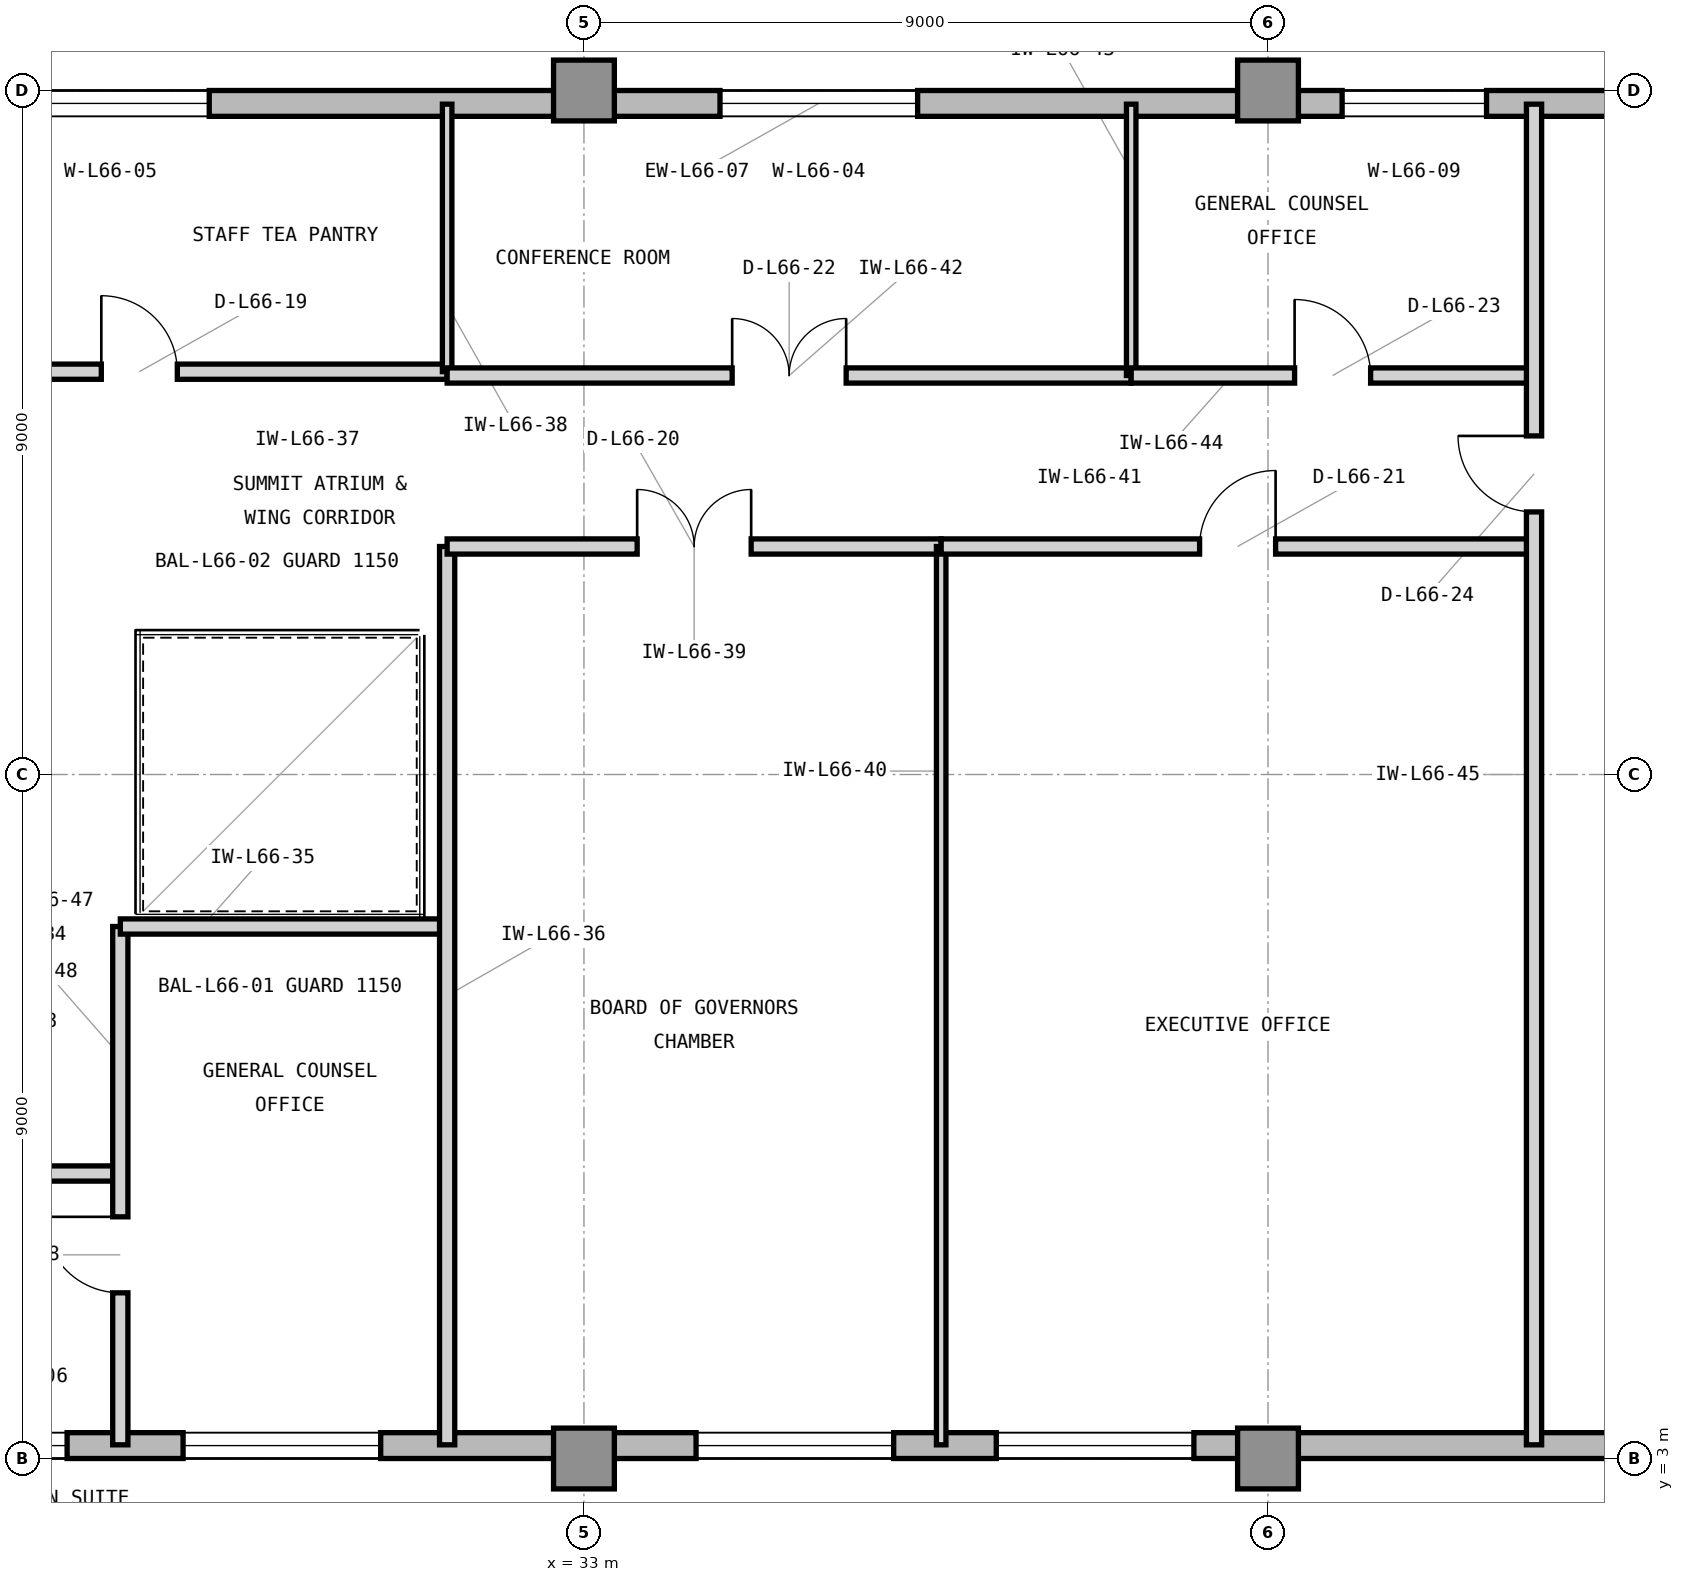
"""IFC4 building model, lengths in metres.
Left out: names, types, materials, properties, quantities, classifications, styles, units other than length and angle.
Written with IfcOpenShell. Run it as: python <this file> out.ifc"""

import sys

from ifc_helpers import new_model, si_unit, direction, frame, frame_2d, origin, origin_2d, place, context, subcontext, project, spatial, rectangle, extrude, element, fill, save


model = new_model("IFC4")
c1 = context("Model", 3, precision=1e-05, world=origin(), true_north=direction((0.0, 1.0)))
c2 = subcontext(c1, "Body", "Model", "MODEL_VIEW")
j1 = project(units=[si_unit("LENGTHUNIT", "METRE"), si_unit("PLANEANGLEUNIT", "RADIAN")], contexts=[c1])
p1 = place(None, origin())
s1 = spatial("IfcSite", under=j1, at=p1, CompositionType="ELEMENT")
p2 = place(p1, origin())
s2 = spatial("IfcBuilding", under=s1, at=p2, CompositionType="ELEMENT")
p3 = place(p2, frame((0.0, 0.0, 270.3)))
s3 = spatial("IfcBuildingStorey", under=s2, at=p3, CompositionType="ELEMENT", Elevation=270.3)
for number, where, z_axis, x_axis in (
    (1, (33.0, 3.0, 0.0), (0.0, 0.0, 1.0), (1.0, 0.0, 0.0)),
    (2, (33.0, 21.0, 0.0), (0.0, 0.0, 1.0), (1.0, 0.0, 0.0)),
    (3, (42.0, 3.0, 0.0), (0.0, 0.0, 1.0), (1.0, 0.0, 0.0)),
    (4, (42.0, 21.0, 0.0), (0.0, 0.0, 1.0), (1.0, 0.0, 0.0)),
):
    element("IfcColumn", number, at=place(p3, frame(where, z_axis=z_axis, x_axis=x_axis)), inside=s3, PredefinedType="COLUMN", context=c2, shape_type="SweptSolid", body=[
        extrude(rectangle(XDim=0.8, YDim=0.8, at=origin_2d()), origin(), (0.0, 0.0, 1.0), 3.9),
    ])
p4 = place(p3, frame((23.9, 3.17, 0.0), z_axis=(0.0, 0.0, 1.0), x_axis=(1.0, 0.0, 0.0)))
e5 = element("IfcWall", 5, at=p4, inside=s3, PredefinedType="STANDARD", context=c2, shape_type="SweptSolid", body=[
    extrude(rectangle(XDim=28.5, YDim=0.34, at=frame_2d((14.25, 0.0))), origin(), (0.0, 0.0, 1.0), 3.715),
])
p5 = place(p4, frame((10.575, 0.0, 0.8)))
e6 = element("IfcOpeningElement", 6, at=p5, cuts=e5, PredefinedType="OPENING", context=c2, shape_type="SweptSolid", body=[
    extrude(rectangle(XDim=2.6, YDim=2.35, at=frame_2d((1.3, 1.175))), frame((0.0, 0.18, 0.0), z_axis=(0.0, -1.0, 0.0), x_axis=(1.0, 0.0, 0.0)), (0.0, 0.0, 1.0), 0.36),
])
p6 = place(p4, frame((1.1, 0.0, 0.8)))
e7 = element("IfcOpeningElement", 7, at=p6, cuts=e5, PredefinedType="OPENING", context=c2, shape_type="SweptSolid", body=[
    extrude(rectangle(XDim=1.2, YDim=2.35, at=frame_2d((0.6, 1.175))), frame((0.0, 0.18, 0.0), z_axis=(0.0, -1.0, 0.0), x_axis=(1.0, 0.0, 0.0)), (0.0, 0.0, 1.0), 0.36),
])
p7 = place(p4, frame((3.826, 0.0, 0.8)))
e8 = element("IfcOpeningElement", 8, at=p7, cuts=e5, PredefinedType="OPENING", context=c2, shape_type="SweptSolid", body=[
    extrude(rectangle(XDim=2.6, YDim=2.35, at=frame_2d((1.3, 1.175))), frame((0.0, 0.18, 0.0), z_axis=(0.0, -1.0, 0.0), x_axis=(1.0, 0.0, 0.0)), (0.0, 0.0, 1.0), 0.36),
])
p8 = place(p4, frame((14.525, 0.0, 0.8)))
e9 = element("IfcOpeningElement", 9, at=p8, cuts=e5, PredefinedType="OPENING", context=c2, shape_type="SweptSolid", body=[
    extrude(rectangle(XDim=2.6, YDim=2.35, at=frame_2d((1.3, 1.175))), frame((0.0, 0.18, 0.0), z_axis=(0.0, -1.0, 0.0), x_axis=(1.0, 0.0, 0.0)), (0.0, 0.0, 1.0), 0.36),
])
p9 = place(p3, frame((52.4, 20.83, 0.0), z_axis=(0.0, 0.0, 1.0), x_axis=(-1.0, 0.0, 0.0)))
e10 = element("IfcWall", 10, at=p9, inside=s3, PredefinedType="STANDARD", context=c2, shape_type="SweptSolid", body=[
    extrude(rectangle(XDim=32.62, YDim=0.34, at=frame_2d((16.31, 0.0))), origin(), (0.0, 0.0, 1.0), 3.715),
])
p10 = place(p9, frame((15.01, 0.0, 0.8)))
e11 = element("IfcOpeningElement", 11, at=p10, cuts=e10, PredefinedType="OPENING", context=c2, shape_type="SweptSolid", body=[
    extrude(rectangle(XDim=2.6, YDim=2.35, at=frame_2d((1.3, 1.175))), frame((0.0, 0.18, 0.0), z_axis=(0.0, -1.0, 0.0), x_axis=(1.0, 0.0, 0.0)), (0.0, 0.0, 1.0), 0.36),
])
p11 = place(p9, frame((24.33, 0.0, 0.8)))
e12 = element("IfcOpeningElement", 12, at=p11, cuts=e10, PredefinedType="OPENING", context=c2, shape_type="SweptSolid", body=[
    extrude(rectangle(XDim=2.6, YDim=2.35, at=frame_2d((1.3, 1.175))), frame((0.0, 0.18, 0.0), z_axis=(0.0, -1.0, 0.0), x_axis=(1.0, 0.0, 0.0)), (0.0, 0.0, 1.0), 0.36),
])
p12 = place(p9, frame((7.525, 0.0, 0.8)))
e13 = element("IfcOpeningElement", 13, at=p12, cuts=e10, PredefinedType="OPENING", context=c2, shape_type="SweptSolid", body=[
    extrude(rectangle(XDim=1.9, YDim=2.35, at=frame_2d((0.95, 1.175))), frame((0.0, 0.18, 0.0), z_axis=(0.0, -1.0, 0.0), x_axis=(1.0, 0.0, 0.0)), (0.0, 0.0, 1.0), 0.36),
])
p13 = place(p3, frame((23.85, 6.75, 0.0), z_axis=(0.0, 0.0, 1.0), x_axis=(1.0, 0.0, 0.0)))
e14 = element("IfcWall", 14, at=p13, inside=s3, PredefinedType="PARTITIONING", context=c2, shape_type="SweptSolid", body=[
    extrude(rectangle(XDim=3.05, YDim=0.2, at=frame_2d((1.525, 0.0))), origin(), (0.0, 0.0, 1.0), 3.705),
])
p14 = place(p13, frame((0.9, 0.0, 0.0)))
e15 = element("IfcOpeningElement", 15, at=p14, cuts=e14, PredefinedType="OPENING", context=c2, shape_type="SweptSolid", body=[
    extrude(rectangle(XDim=1.0, YDim=2.15, at=frame_2d((0.5, 1.075))), frame((0.0, 0.11, 0.0), z_axis=(0.0, -1.0, 0.0), x_axis=(1.0, 0.0, 0.0)), (0.0, 0.0, 1.0), 0.22),
])
p15 = place(p3, frame((26.9, 3.18, 0.0), z_axis=(0.0, 0.0, 1.0), x_axis=(0.0, 1.0, 0.0)))
e16 = element("IfcWall", 16, at=p15, inside=s3, PredefinedType="PARTITIONING", context=c2, shape_type="SweptSolid", body=[
    extrude(rectangle(XDim=6.82, YDim=0.2, at=frame_2d((3.41, 0.0))), origin(), (0.0, 0.0, 1.0), 3.705),
])
p16 = place(p15, frame((2.0, 0.0, 0.0)))
e17 = element("IfcOpeningElement", 17, at=p16, cuts=e16, PredefinedType="OPENING", context=c2, shape_type="SweptSolid", body=[
    extrude(rectangle(XDim=1.0, YDim=2.15, at=frame_2d((0.5, 1.075))), frame((0.0, 0.11, 0.0), z_axis=(0.0, -1.0, 0.0), x_axis=(1.0, 0.0, 0.0)), (0.0, 0.0, 1.0), 0.22),
])
p17 = place(p3, frame((26.9, 10.0, 0.0), z_axis=(0.0, 0.0, 1.0), x_axis=(1.0, 0.0, 0.0)))
e18 = element("IfcWall", 18, at=p17, inside=s3, PredefinedType="PARTITIONING", context=c2, shape_type="SweptSolid", body=[
    extrude(rectangle(XDim=4.3, YDim=0.2, at=frame_2d((2.15, 0.0))), origin(), (0.0, 0.0, 1.0), 3.705),
])
p18 = place(p3, frame((31.2, 3.18, 0.0), z_axis=(0.0, 0.0, 1.0), x_axis=(0.0, 1.0, 0.0)))
e19 = element("IfcWall", 19, at=p18, inside=s3, PredefinedType="PARTITIONING", context=c2, shape_type="SweptSolid", body=[
    extrude(rectangle(XDim=11.82, YDim=0.2, at=frame_2d((5.91, 0.0))), origin(), (0.0, 0.0, 1.0), 3.705),
])
p19 = place(p3, frame((23.85, 17.3, 0.0), z_axis=(0.0, 0.0, 1.0), x_axis=(1.0, 0.0, 0.0)))
e20 = element("IfcWall", 20, at=p19, inside=s3, PredefinedType="PARTITIONING", context=c2, shape_type="SweptSolid", body=[
    extrude(rectangle(XDim=7.35, YDim=0.2, at=frame_2d((3.675, 0.0))), origin(), (0.0, 0.0, 1.0), 3.705),
])
p20 = place(p19, frame((2.8, 0.0, 0.0)))
e21 = element("IfcOpeningElement", 21, at=p20, cuts=e20, PredefinedType="OPENING", context=c2, shape_type="SweptSolid", body=[
    extrude(rectangle(XDim=1.0, YDim=2.15, at=frame_2d((0.5, 1.075))), frame((0.0, 0.11, 0.0), z_axis=(0.0, -1.0, 0.0), x_axis=(1.0, 0.0, 0.0)), (0.0, 0.0, 1.0), 0.22),
])
p21 = place(p3, frame((31.2, 17.3, 0.0), z_axis=(0.0, 0.0, 1.0), x_axis=(0.0, 1.0, 0.0)))
e22 = element("IfcWall", 22, at=p21, inside=s3, PredefinedType="PARTITIONING", context=c2, shape_type="SweptSolid", body=[
    extrude(rectangle(XDim=3.52, YDim=0.125, at=frame_2d((1.76, 0.0))), origin(), (0.0, 0.0, 1.0), 3.705),
])
p22 = place(p3, frame((31.2, 15.0, 0.0), z_axis=(0.0, 0.0, 1.0), x_axis=(1.0, 0.0, 0.0)))
e23 = element("IfcWall", 23, at=p22, inside=s3, PredefinedType="PARTITIONING", context=c2, shape_type="SweptSolid", body=[
    extrude(rectangle(XDim=6.5, YDim=0.2, at=frame_2d((3.25, 0.0))), origin(), (0.0, 0.0, 1.0), 3.301),
])
p23 = place(p22, frame((2.5, 0.0, 0.0)))
e24 = element("IfcOpeningElement", 24, at=p23, cuts=e23, PredefinedType="OPENING", context=c2, shape_type="SweptSolid", body=[
    extrude(rectangle(XDim=1.5, YDim=2.3, at=frame_2d((0.75, 1.15))), frame((0.0, 0.11, 0.0), z_axis=(0.0, -1.0, 0.0), x_axis=(1.0, 0.0, 0.0)), (0.0, 0.0, 1.0), 0.22),
])
p24 = place(p3, frame((37.7, 3.18, 0.0), z_axis=(0.0, 0.0, 1.0), x_axis=(0.0, 1.0, 0.0)))
e25 = element("IfcWall", 25, at=p24, inside=s3, PredefinedType="PARTITIONING", context=c2, shape_type="SweptSolid", body=[
    extrude(rectangle(XDim=11.82, YDim=0.125, at=frame_2d((5.91, 0.0))), origin(), (0.0, 0.0, 1.0), 3.705),
])
p25 = place(p3, frame((37.7, 15.0, 0.0), z_axis=(0.0, 0.0, 1.0), x_axis=(1.0, 0.0, 0.0)))
e26 = element("IfcWall", 26, at=p25, inside=s3, PredefinedType="PARTITIONING", context=c2, shape_type="SweptSolid", body=[
    extrude(rectangle(XDim=7.8, YDim=0.2, at=frame_2d((3.9, 0.0))), origin(), (0.0, 0.0, 1.0), 3.301),
])
p26 = place(p25, frame((3.4, 0.0, 0.0)))
e27 = element("IfcOpeningElement", 27, at=p26, cuts=e26, PredefinedType="OPENING", context=c2, shape_type="SweptSolid", body=[
    extrude(rectangle(XDim=1.0, YDim=2.15, at=frame_2d((0.5, 1.075))), frame((0.0, 0.11, 0.0), z_axis=(0.0, -1.0, 0.0), x_axis=(1.0, 0.0, 0.0)), (0.0, 0.0, 1.0), 0.22),
])
p27 = place(p3, frame((31.2, 17.25, 0.0), z_axis=(0.0, 0.0, 1.0), x_axis=(1.0, 0.0, 0.0)))
e28 = element("IfcWall", 28, at=p27, inside=s3, PredefinedType="PARTITIONING", context=c2, shape_type="SweptSolid", body=[
    extrude(rectangle(XDim=9.0, YDim=0.2, at=frame_2d((4.5, 0.0))), origin(), (0.0, 0.0, 1.0), 3.705),
])
p28 = place(p27, frame((3.75, 0.0, 0.0)))
e29 = element("IfcOpeningElement", 29, at=p28, cuts=e28, PredefinedType="OPENING", context=c2, shape_type="SweptSolid", body=[
    extrude(rectangle(XDim=1.5, YDim=2.3, at=frame_2d((0.75, 1.15))), frame((0.0, 0.11, 0.0), z_axis=(0.0, -1.0, 0.0), x_axis=(1.0, 0.0, 0.0)), (0.0, 0.0, 1.0), 0.22),
])
p29 = place(p3, frame((40.2, 17.25, 0.0), z_axis=(0.0, 0.0, 1.0), x_axis=(0.0, 1.0, 0.0)))
e30 = element("IfcWall", 30, at=p29, inside=s3, PredefinedType="PARTITIONING", context=c2, shape_type="SweptSolid", body=[
    extrude(rectangle(XDim=3.57, YDim=0.125, at=frame_2d((1.785, 0.0))), origin(), (0.0, 0.0, 1.0), 3.705),
])
p30 = place(p3, frame((40.2, 17.25, 0.0), z_axis=(0.0, 0.0, 1.0), x_axis=(1.0, 0.0, 0.0)))
e31 = element("IfcWall", 31, at=p30, inside=s3, PredefinedType="PARTITIONING", context=c2, shape_type="SweptSolid", body=[
    extrude(rectangle(XDim=5.3, YDim=0.2, at=frame_2d((2.65, 0.0))), origin(), (0.0, 0.0, 1.0), 3.705),
])
p31 = place(p30, frame((2.15, 0.0, 0.0)))
e32 = element("IfcOpeningElement", 32, at=p31, cuts=e31, PredefinedType="OPENING", context=c2, shape_type="SweptSolid", body=[
    extrude(rectangle(XDim=1.0, YDim=2.15, at=frame_2d((0.5, 1.075))), frame((0.0, 0.11, 0.0), z_axis=(0.0, -1.0, 0.0), x_axis=(1.0, 0.0, 0.0)), (0.0, 0.0, 1.0), 0.22),
])
p32 = place(p3, frame((45.5, 3.18, 0.0), z_axis=(0.0, 0.0, 1.0), x_axis=(0.0, 1.0, 0.0)))
e33 = element("IfcWall", 33, at=p32, inside=s3, PredefinedType="PARTITIONING", context=c2, shape_type="SweptSolid", body=[
    extrude(rectangle(XDim=17.64, YDim=0.2, at=frame_2d((8.82, 0.0))), origin(), (0.0, 0.0, 1.0), 3.705),
])
p33 = place(p32, frame((12.275, 0.0, 0.0)))
e34 = element("IfcOpeningElement", 34, at=p33, cuts=e33, PredefinedType="OPENING", context=c2, shape_type="SweptSolid", body=[
    extrude(rectangle(XDim=1.0, YDim=2.15, at=frame_2d((0.5, 1.075))), frame((0.0, 0.11, 0.0), z_axis=(0.0, -1.0, 0.0), x_axis=(1.0, 0.0, 0.0)), (0.0, 0.0, 1.0), 0.22),
])
p34 = place(p5, origin())
e35 = element("IfcWindow", 35, at=p34, inside=s3, PartitioningType="SINGLE_PANEL", PredefinedType="WINDOW", context=c2, shape_type="SweptSolid", body=[
    extrude(rectangle(XDim=2.6, YDim=2.35, at=frame_2d((1.3, 1.175))), frame((0.0, 0.11, 0.0), z_axis=(0.0, -1.0, 0.0), x_axis=(1.0, 0.0, 0.0)), (0.0, 0.0, 1.0), 0.06),
])
fill(e6, e35)
p35 = place(p10, origin())
e36 = element("IfcWindow", 36, at=p35, inside=s3, PartitioningType="SINGLE_PANEL", PredefinedType="WINDOW", context=c2, shape_type="SweptSolid", body=[
    extrude(rectangle(XDim=2.6, YDim=2.35, at=frame_2d((1.3, 1.175))), frame((0.0, 0.11, 0.0), z_axis=(0.0, -1.0, 0.0), x_axis=(1.0, 0.0, 0.0)), (0.0, 0.0, 1.0), 0.06),
])
fill(e11, e36)
p36 = place(p11, origin())
e37 = element("IfcWindow", 37, at=p36, inside=s3, PartitioningType="SINGLE_PANEL", PredefinedType="WINDOW", context=c2, shape_type="SweptSolid", body=[
    extrude(rectangle(XDim=2.6, YDim=2.35, at=frame_2d((1.3, 1.175))), frame((0.0, 0.11, 0.0), z_axis=(0.0, -1.0, 0.0), x_axis=(1.0, 0.0, 0.0)), (0.0, 0.0, 1.0), 0.06),
])
fill(e12, e37)
p37 = place(p16, origin())
e38 = element("IfcDoor", 38, at=p37, inside=s3, OperationType="SINGLE_SWING_RIGHT", PredefinedType="DOOR", context=c2, shape_type="SweptSolid", body=[
    extrude(rectangle(XDim=1.0, YDim=2.15, at=frame_2d((0.5, 1.075))), frame((0.0, 0.025, 0.0), z_axis=(0.0, -1.0, 0.0), x_axis=(1.0, 0.0, 0.0)), (0.0, 0.0, 1.0), 0.05),
])
fill(e17, e38)
p38 = place(p20, origin())
e39 = element("IfcDoor", 39, at=p38, inside=s3, OperationType="SINGLE_SWING_LEFT", PredefinedType="DOOR", context=c2, shape_type="SweptSolid", body=[
    extrude(rectangle(XDim=1.0, YDim=2.15, at=frame_2d((0.5, 1.075))), frame((0.0, 0.025, 0.0), z_axis=(0.0, -1.0, 0.0), x_axis=(1.0, 0.0, 0.0)), (0.0, 0.0, 1.0), 0.05),
])
fill(e21, e39)
p39 = place(p23, origin())
e40 = element("IfcDoor", 40, at=p39, inside=s3, OperationType="DOUBLE_DOOR_SINGLE_SWING", PredefinedType="DOOR", context=c2, shape_type="SweptSolid", body=[
    extrude(rectangle(XDim=1.5, YDim=2.3, at=frame_2d((0.75, 1.15))), frame((0.0, 0.025, 0.0), z_axis=(0.0, -1.0, 0.0), x_axis=(1.0, 0.0, 0.0)), (0.0, 0.0, 1.0), 0.05),
])
fill(e24, e40)
p40 = place(p26, origin())
e41 = element("IfcDoor", 41, at=p40, inside=s3, OperationType="SINGLE_SWING_RIGHT", PredefinedType="DOOR", context=c2, shape_type="SweptSolid", body=[
    extrude(rectangle(XDim=1.0, YDim=2.15, at=frame_2d((0.5, 1.075))), frame((0.0, 0.025, 0.0), z_axis=(0.0, -1.0, 0.0), x_axis=(1.0, 0.0, 0.0)), (0.0, 0.0, 1.0), 0.05),
])
fill(e27, e41)
p41 = place(p28, origin())
e42 = element("IfcDoor", 42, at=p41, inside=s3, OperationType="DOUBLE_DOOR_SINGLE_SWING", PredefinedType="DOOR", context=c2, shape_type="SweptSolid", body=[
    extrude(rectangle(XDim=1.5, YDim=2.3, at=frame_2d((0.75, 1.15))), frame((0.0, 0.025, 0.0), z_axis=(0.0, -1.0, 0.0), x_axis=(1.0, 0.0, 0.0)), (0.0, 0.0, 1.0), 0.05),
])
fill(e29, e42)
p42 = place(p31, origin())
e43 = element("IfcDoor", 43, at=p42, inside=s3, OperationType="SINGLE_SWING_LEFT", PredefinedType="DOOR", context=c2, shape_type="SweptSolid", body=[
    extrude(rectangle(XDim=1.0, YDim=2.15, at=frame_2d((0.5, 1.075))), frame((0.0, 0.025, 0.0), z_axis=(0.0, -1.0, 0.0), x_axis=(1.0, 0.0, 0.0)), (0.0, 0.0, 1.0), 0.05),
])
fill(e32, e43)
p43 = place(p33, origin())
e44 = element("IfcDoor", 44, at=p43, inside=s3, OperationType="SINGLE_SWING_RIGHT", PredefinedType="DOOR", context=c2, shape_type="SweptSolid", body=[
    extrude(rectangle(XDim=1.0, YDim=2.15, at=frame_2d((0.5, 1.075))), frame((0.0, 0.025, 0.0), z_axis=(0.0, -1.0, 0.0), x_axis=(1.0, 0.0, 0.0)), (0.0, 0.0, 1.0), 0.05),
])
fill(e34, e44)
p44 = place(p6, origin())
e45 = element("IfcWindow", 45, at=p44, inside=s3, PartitioningType="SINGLE_PANEL", PredefinedType="WINDOW", context=c2, shape_type="SweptSolid", body=[
    extrude(rectangle(XDim=1.2, YDim=2.35, at=frame_2d((0.6, 1.175))), frame((0.0, 0.11, 0.0), z_axis=(0.0, -1.0, 0.0), x_axis=(1.0, 0.0, 0.0)), (0.0, 0.0, 1.0), 0.06),
])
fill(e7, e45)
p45 = place(p7, origin())
e46 = element("IfcWindow", 46, at=p45, inside=s3, PartitioningType="SINGLE_PANEL", PredefinedType="WINDOW", context=c2, shape_type="SweptSolid", body=[
    extrude(rectangle(XDim=2.6, YDim=2.35, at=frame_2d((1.3, 1.175))), frame((0.0, 0.11, 0.0), z_axis=(0.0, -1.0, 0.0), x_axis=(1.0, 0.0, 0.0)), (0.0, 0.0, 1.0), 0.06),
])
fill(e8, e46)
p46 = place(p8, origin())
e47 = element("IfcWindow", 47, at=p46, inside=s3, PartitioningType="SINGLE_PANEL", PredefinedType="WINDOW", context=c2, shape_type="SweptSolid", body=[
    extrude(rectangle(XDim=2.6, YDim=2.35, at=frame_2d((1.3, 1.175))), frame((0.0, 0.11, 0.0), z_axis=(0.0, -1.0, 0.0), x_axis=(1.0, 0.0, 0.0)), (0.0, 0.0, 1.0), 0.06),
])
fill(e9, e47)
p47 = place(p12, origin())
e48 = element("IfcWindow", 48, at=p47, inside=s3, PartitioningType="SINGLE_PANEL", PredefinedType="WINDOW", context=c2, shape_type="SweptSolid", body=[
    extrude(rectangle(XDim=1.9, YDim=2.35, at=frame_2d((0.95, 1.175))), frame((0.0, 0.11, 0.0), z_axis=(0.0, -1.0, 0.0), x_axis=(1.0, 0.0, 0.0)), (0.0, 0.0, 1.0), 0.06),
])
fill(e13, e48)
save(model, sys.argv[1])
